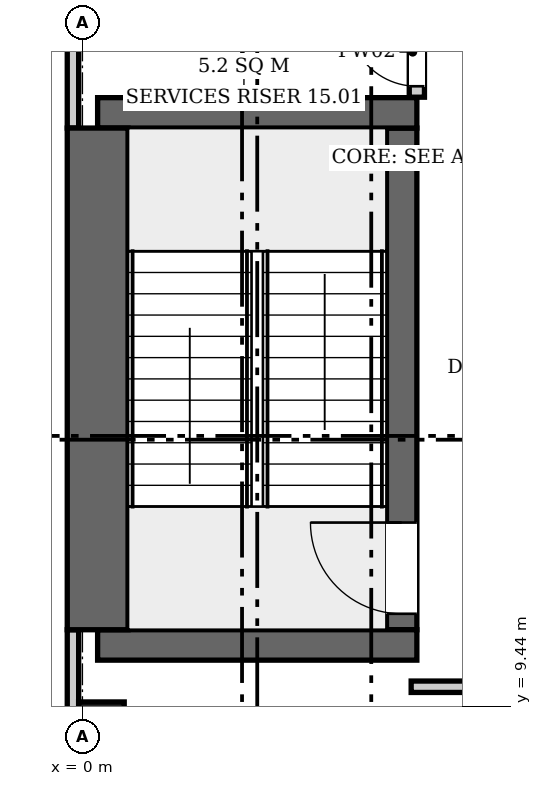
"""IFC4 building model, lengths in metres.
Left out: names, types, materials, properties, quantities, classifications, styles, units other than length and angle.
Written with IfcOpenShell. Run it as: python <this file> out.ifc"""

import sys

from ifc_helpers import new_model, si_unit, direction, frame, frame_2d, origin, origin_2d, place, context, subcontext, project, spatial, rectangle, extrude, element, fill, save


model = new_model("IFC4")
c1 = context("Model", 3, precision=1e-05, world=origin(), true_north=direction((0.0, 1.0)))
c2 = subcontext(c1, "Body", "Model", "MODEL_VIEW")
j1 = project(units=[si_unit("LENGTHUNIT", "METRE"), si_unit("PLANEANGLEUNIT", "RADIAN")], contexts=[c1])
p1 = place(None, origin())
s1 = spatial("IfcSite", under=j1, at=p1, CompositionType="ELEMENT")
p2 = place(p1, origin())
s2 = spatial("IfcBuilding", under=s1, at=p2, CompositionType="ELEMENT")
p3 = place(p2, frame((0.0, 0.0, 73.9)))
s3 = spatial("IfcBuildingStorey", under=s2, at=p3, CompositionType="ELEMENT", Elevation=73.9)
for number, where, z_axis, x_axis in (
    (1, (0.2, 10.25, 0.0), (0.0, 0.0, 1.0), (1.0, 0.0, 0.0)),
    (2, (0.2, 17.25, 0.0), (0.0, 0.0, 1.0), (1.0, 0.0, 0.0)),
):
    element("IfcWall", number, at=place(p3, frame(where, z_axis=z_axis, x_axis=x_axis)), inside=s3, PredefinedType="SHEAR", context=c2, shape_type="SweptSolid", body=[
        extrude(rectangle(XDim=4.2, YDim=0.4, at=frame_2d((2.1, 0.0))), origin(), (0.0, 0.0, 1.0), 4.2),
    ])
p4 = place(p3, frame((0.2, 10.45, 0.0), z_axis=(0.0, 0.0, 1.0), x_axis=(0.0, 1.0, 0.0)))
e3 = element("IfcWall", 3, at=p4, inside=s3, PredefinedType="SHEAR", context=c2, shape_type="SweptSolid", body=[
    extrude(rectangle(XDim=6.6, YDim=0.8, at=frame_2d((3.3, 0.0))), origin(), (0.0, 0.0, 1.0), 4.2),
])
p5 = place(p3, frame((4.2, 10.45, 0.0), z_axis=(0.0, 0.0, 1.0), x_axis=(0.0, 1.0, 0.0)))
e4 = element("IfcWall", 4, at=p5, inside=s3, PredefinedType="SHEAR", context=c2, shape_type="SweptSolid", body=[
    extrude(rectangle(XDim=6.6, YDim=0.4, at=frame_2d((3.3, 0.0))), origin(), (0.0, 0.0, 1.0), 4.2),
])
p6 = place(p5, frame((0.21, 0.0, 0.0)))
e5 = element("IfcOpeningElement", 5, at=p6, cuts=e4, PredefinedType="OPENING", context=c2, shape_type="SweptSolid", body=[
    extrude(rectangle(XDim=1.2, YDim=2.1, at=frame_2d((0.6, 1.05))), frame((0.0, 0.21, 0.0), z_axis=(0.0, -1.0, 0.0), x_axis=(1.0, 0.0, 0.0)), (0.0, 0.0, 1.0), 0.42),
])
p7 = place(p3, frame((0.25, 9.2, 0.0), z_axis=(0.0, 0.0, 1.0), x_axis=(1.0, 0.0, 0.0)))
e6 = element("IfcColumn", 6, at=p7, inside=s3, PredefinedType="COLUMN", context=c2, shape_type="SweptSolid", body=[
    extrude(rectangle(XDim=0.6, YDim=0.6, at=origin_2d()), origin(), (0.0, 0.0, 1.0), 4.2),
])
p8 = place(p3, frame((-0.125, 10.45, 0.0), z_axis=(0.0, 0.0, 1.0), x_axis=(0.0, -1.0, 0.0)))
e7 = element("IfcWall", 7, at=p8, inside=s3, PredefinedType="ELEMENTEDWALL", context=c2, shape_type="SweptSolid", body=[
    extrude(rectangle(XDim=10.65, YDim=0.15, at=frame_2d((5.325, 0.0))), origin(), (0.0, 0.0, 1.0), 3.9),
])
p9 = place(p8, frame((8.325, 0.0, 0.9)))
e8 = element("IfcOpeningElement", 8, at=p9, cuts=e7, PredefinedType="OPENING", context=c2, shape_type="SweptSolid", body=[
    extrude(rectangle(XDim=1.2, YDim=2.6, at=frame_2d((0.6, 1.3))), frame((0.0, 0.085, 0.0), z_axis=(0.0, -1.0, 0.0), x_axis=(1.0, 0.0, 0.0)), (0.0, 0.0, 1.0), 0.17),
])
p10 = place(p8, frame((5.925, 0.0, 0.9)))
e9 = element("IfcOpeningElement", 9, at=p10, cuts=e7, PredefinedType="OPENING", context=c2, shape_type="SweptSolid", body=[
    extrude(rectangle(XDim=1.2, YDim=2.6, at=frame_2d((0.6, 1.3))), frame((0.0, 0.085, 0.0), z_axis=(0.0, -1.0, 0.0), x_axis=(1.0, 0.0, 0.0)), (0.0, 0.0, 1.0), 0.17),
])
p11 = place(p8, frame((3.525, 0.0, 0.9)))
e10 = element("IfcOpeningElement", 10, at=p11, cuts=e7, PredefinedType="OPENING", context=c2, shape_type="SweptSolid", body=[
    extrude(rectangle(XDim=1.2, YDim=2.6, at=frame_2d((0.6, 1.3))), frame((0.0, 0.085, 0.0), z_axis=(0.0, -1.0, 0.0), x_axis=(1.0, 0.0, 0.0)), (0.0, 0.0, 1.0), 0.17),
])
p12 = place(p8, frame((1.125, 0.0, 0.9)))
e11 = element("IfcOpeningElement", 11, at=p12, cuts=e7, PredefinedType="OPENING", context=c2, shape_type="SweptSolid", body=[
    extrude(rectangle(XDim=1.2, YDim=2.6, at=frame_2d((0.6, 1.3))), frame((0.0, 0.085, 0.0), z_axis=(0.0, -1.0, 0.0), x_axis=(1.0, 0.0, 0.0)), (0.0, 0.0, 1.0), 0.17),
])
p13 = place(p3, frame((-0.125, 18.85, 0.0), z_axis=(0.0, 0.0, 1.0), x_axis=(0.0, -1.0, 0.0)))
e12 = element("IfcWall", 12, at=p13, inside=s3, PredefinedType="ELEMENTEDWALL", context=c2, shape_type="SweptSolid", body=[
    extrude(rectangle(XDim=1.8, YDim=0.15, at=frame_2d((0.9, 0.0))), origin(), (0.0, 0.0, 1.0), 3.9),
])
p14 = place(p3, frame((4.4, 17.456, 0.0), z_axis=(0.0, 0.0, 1.0), x_axis=(0.0, 1.0, 0.0)))
e13 = element("IfcWall", 13, at=p14, inside=s3, PredefinedType="PARTITIONING", context=c2, shape_type="SweptSolid", body=[
    extrude(rectangle(XDim=1.188, YDim=0.2, at=frame_2d((0.594, 0.0))), origin(), (0.0, 0.0, 1.0), 3.9),
])
p15 = place(p14, frame((0.144, 0.0, 0.0)))
e14 = element("IfcOpeningElement", 14, at=p15, cuts=e13, PredefinedType="OPENING", context=c2, shape_type="SweptSolid", body=[
    extrude(rectangle(XDim=0.9, YDim=2.1, at=frame_2d((0.45, 1.05))), frame((0.0, 0.11, 0.0), z_axis=(0.0, -1.0, 0.0), x_axis=(1.0, 0.0, 0.0)), (0.0, 0.0, 1.0), 0.22),
])
p16 = place(p3, frame((4.325, 9.7, 0.0), z_axis=(0.0, 0.0, 1.0), x_axis=(1.0, 0.0, 0.0)))
e15 = element("IfcWall", 15, at=p16, inside=s3, PredefinedType="PARTITIONING", context=c2, shape_type="SweptSolid", body=[
    extrude(rectangle(XDim=34.369, YDim=0.15, at=frame_2d((17.185, 0.0))), origin(), (0.0, 0.0, 1.0), 3.9),
])
p17 = place(p16, frame((3.975, 0.0, 0.0)))
e16 = element("IfcOpeningElement", 16, at=p17, cuts=e15, PredefinedType="OPENING", context=c2, shape_type="SweptSolid", body=[
    extrude(rectangle(XDim=1.0, YDim=2.1, at=frame_2d((0.5, 1.05))), frame((0.0, 0.085, 0.0), z_axis=(0.0, -1.0, 0.0), x_axis=(1.0, 0.0, 0.0)), (0.0, 0.0, 1.0), 0.17),
])
p18 = place(p16, frame((11.975, 0.0, 0.0)))
e17 = element("IfcOpeningElement", 17, at=p18, cuts=e15, PredefinedType="OPENING", context=c2, shape_type="SweptSolid", body=[
    extrude(rectangle(XDim=1.0, YDim=2.1, at=frame_2d((0.5, 1.05))), frame((0.0, 0.085, 0.0), z_axis=(0.0, -1.0, 0.0), x_axis=(1.0, 0.0, 0.0)), (0.0, 0.0, 1.0), 0.17),
])
p19 = place(p16, frame((19.175, 0.0, 0.0)))
e18 = element("IfcOpeningElement", 18, at=p19, cuts=e15, PredefinedType="OPENING", context=c2, shape_type="SweptSolid", body=[
    extrude(rectangle(XDim=1.0, YDim=2.1, at=frame_2d((0.5, 1.05))), frame((0.0, 0.085, 0.0), z_axis=(0.0, -1.0, 0.0), x_axis=(1.0, 0.0, 0.0)), (0.0, 0.0, 1.0), 0.17),
])
p20 = place(p16, frame((28.925, 0.0, 0.0)))
e19 = element("IfcOpeningElement", 19, at=p20, cuts=e15, PredefinedType="OPENING", context=c2, shape_type="SweptSolid", body=[
    extrude(rectangle(XDim=1.0, YDim=2.1, at=frame_2d((0.5, 1.05))), frame((0.0, 0.085, 0.0), z_axis=(0.0, -1.0, 0.0), x_axis=(1.0, 0.0, 0.0)), (0.0, 0.0, 1.0), 0.17),
])
p21 = place(p6, origin())
e20 = element("IfcDoor", 20, at=p21, inside=s3, OperationType="SINGLE_SWING_RIGHT", PredefinedType="DOOR", context=c2, shape_type="SweptSolid", body=[
    extrude(rectangle(XDim=1.2, YDim=2.1, at=frame_2d((0.6, 1.05))), frame((0.0, 0.025, 0.0), z_axis=(0.0, -1.0, 0.0), x_axis=(1.0, 0.0, 0.0)), (0.0, 0.0, 1.0), 0.05),
])
fill(e5, e20)
p22 = place(p15, origin())
e21 = element("IfcDoor", 21, at=p22, inside=s3, OperationType="SINGLE_SWING_LEFT", PredefinedType="DOOR", context=c2, shape_type="SweptSolid", body=[
    extrude(rectangle(XDim=0.9, YDim=2.1, at=frame_2d((0.45, 1.05))), frame((0.0, 0.025, 0.0), z_axis=(0.0, -1.0, 0.0), x_axis=(1.0, 0.0, 0.0)), (0.0, 0.0, 1.0), 0.05),
])
fill(e14, e21)
save(model, sys.argv[1])
